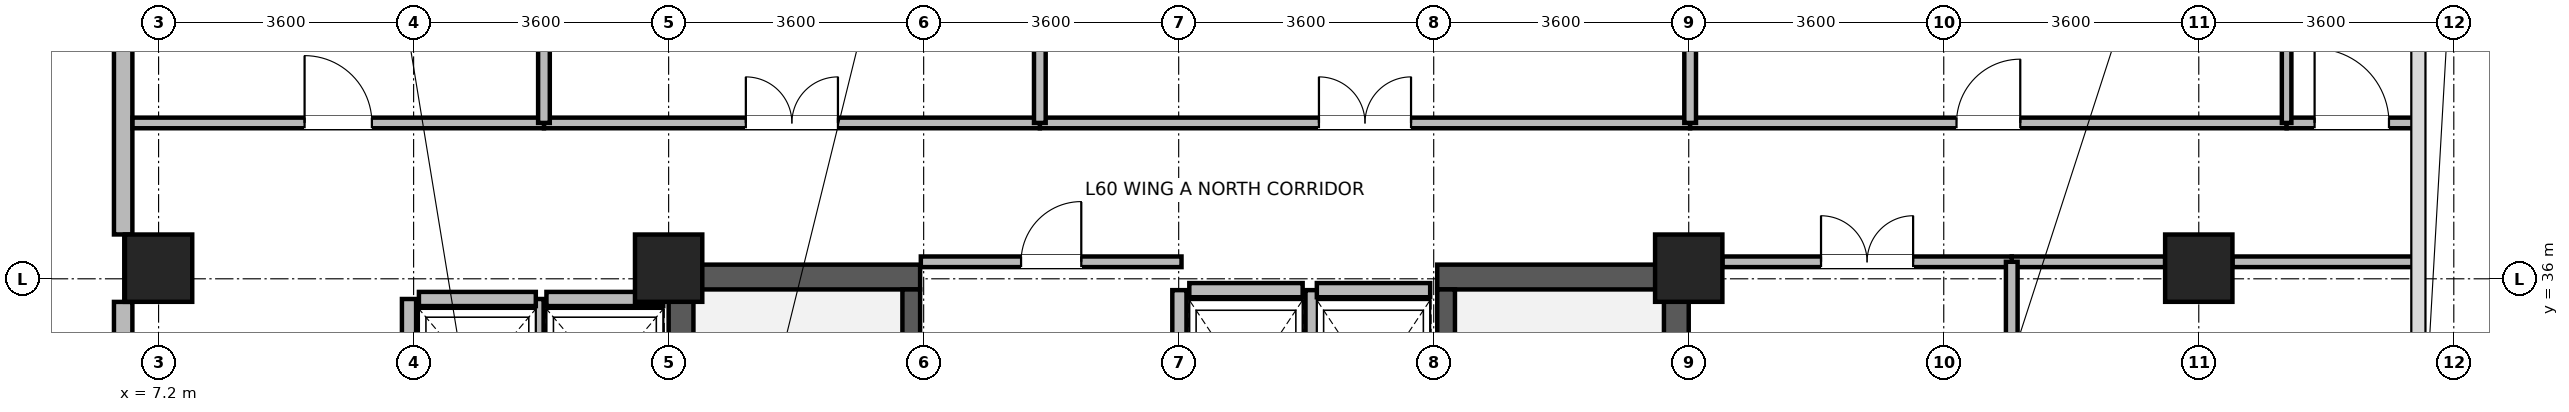
"""IFC4 building model, lengths in metres.
Left out: names, types, materials, properties, quantities, classifications, styles, units other than length and angle.
Written with IfcOpenShell. Run it as: python <this file> out.ifc"""

import sys

from ifc_helpers import new_model, si_unit, direction, frame, frame_2d, origin, origin_2d, place, context, subcontext, project, spatial, rectangle, extrude, source, transform, mapped, element, fill, save


model = new_model("IFC4")
c1 = context("Model", 3, precision=1e-05, world=origin(), true_north=direction((0.0, 1.0)))
c2 = subcontext(c1, "Body", "Model", "MODEL_VIEW")
j1 = project(units=[si_unit("LENGTHUNIT", "METRE"), si_unit("PLANEANGLEUNIT", "RADIAN")], contexts=[c1])
p1 = place(None, origin())
s1 = spatial("IfcSite", under=j1, at=p1, CompositionType="ELEMENT")
p2 = place(p1, origin())
s2 = spatial("IfcBuilding", under=s1, at=p2, CompositionType="ELEMENT")
p3 = place(p2, frame((0.0, 0.0, 235.1)))
s3 = spatial("IfcBuildingStorey", under=s2, at=p3, CompositionType="ELEMENT", Elevation=235.1)
for number, where, z_axis, x_axis in (
    (1, (14.575, 28.5, 0.0), (0.0, 0.0, 1.0), (0.0, 1.0, 0.0)),
    (2, (28.625, 28.5, 0.0), (0.0, 0.0, 1.0), (0.0, 1.0, 0.0)),
):
    element("IfcWall", number, at=place(p3, frame(where, z_axis=z_axis, x_axis=x_axis)), inside=s3, PredefinedType="SHEAR", context=c2, shape_type="SweptSolid", body=[
        extrude(rectangle(XDim=7.7, YDim=0.35, at=frame_2d((3.85, 0.0))), origin(), (0.0, 0.0, 1.0), 3.44),
    ])
for number, where, z_axis, x_axis in (
    (3, (14.75, 36.025, 0.0), (0.0, 0.0, 1.0), (1.0, 0.0, 0.0)),
    (4, (25.25, 36.025, 0.0), (0.0, 0.0, 1.0), (1.0, 0.0, 0.0)),
):
    element("IfcWall", number, at=place(p3, frame(where, z_axis=z_axis, x_axis=x_axis)), inside=s3, PredefinedType="SHEAR", context=c2, shape_type="SweptSolid", body=[
        extrude(rectangle(XDim=3.2, YDim=0.35, at=frame_2d((1.6, 0.0))), origin(), (0.0, 0.0, 1.0), 3.44),
    ])
p4 = place(p3, frame((17.825, 28.85, 0.0), z_axis=(0.0, 0.0, 1.0), x_axis=(0.0, 1.0, 0.0)))
e5 = element("IfcWall", 5, at=p4, inside=s3, PredefinedType="SHEAR", context=c2, shape_type="SweptSolid", body=[
    extrude(rectangle(XDim=7.0, YDim=0.25, at=frame_2d((3.5, 0.0))), origin(), (0.0, 0.0, 1.0), 3.44),
])
p5 = place(p4, frame((0.15, 0.0, 0.0)))
e6 = element("IfcOpeningElement", 6, at=p5, cuts=e5, PredefinedType="OPENING", context=c2, shape_type="SweptSolid", body=[
    extrude(rectangle(XDim=1.1, YDim=2.08, at=frame_2d((0.55, 1.04))), frame((0.0, 0.135, 0.0), z_axis=(0.0, -1.0, 0.0), x_axis=(1.0, 0.0, 0.0)), (0.0, 0.0, 1.0), 0.27),
])
p6 = place(p3, frame((25.375, 28.85, 0.0), z_axis=(0.0, 0.0, 1.0), x_axis=(0.0, 1.0, 0.0)))
e7 = element("IfcWall", 7, at=p6, inside=s3, PredefinedType="SHEAR", context=c2, shape_type="SweptSolid", body=[
    extrude(rectangle(XDim=7.0, YDim=0.25, at=frame_2d((3.5, 0.0))), origin(), (0.0, 0.0, 1.0), 3.44),
])
p7 = place(p6, frame((0.15, 0.0, 0.0)))
e8 = element("IfcOpeningElement", 8, at=p7, cuts=e7, PredefinedType="OPENING", context=c2, shape_type="SweptSolid", body=[
    extrude(rectangle(XDim=1.1, YDim=2.08, at=frame_2d((0.55, 1.04))), frame((0.0, 0.135, 0.0), z_axis=(0.0, -1.0, 0.0), x_axis=(1.0, 0.0, 0.0)), (0.0, 0.0, 1.0), 0.27),
])
m1 = source(origin(), c2, "Body", "SweptSolid", [
    extrude(rectangle(XDim=0.95, YDim=0.95, at=origin_2d()), origin(), (0.0, 0.0, 1.0), 3.7),
])
for number, where, z_axis, x_axis in (
    (9, (7.2, 36.15, 0.0), (0.0, 0.0, 1.0), (1.0, 0.0, 0.0)),
    (10, (14.4, 36.15, 0.0), (0.0, 0.0, 1.0), (1.0, 0.0, 0.0)),
    (11, (28.8, 36.15, 0.0), (0.0, 0.0, 1.0), (1.0, 0.0, 0.0)),
    (12, (36.0, 36.15, 0.0), (0.0, 0.0, 1.0), (1.0, 0.0, 0.0)),
):
    element("IfcColumn", number, at=place(p3, frame(where, z_axis=z_axis, x_axis=x_axis)), inside=s3, PredefinedType="COLUMN", context=c2, shape_type="MappedRepresentation", body=[
        mapped(m1, transform((0.0, 0.0, 0.0), x_axis=(1.0, 0.0, 0.0), y_axis=(0.0, 1.0, 0.0), z_axis=(0.0, 0.0, 1.0), scale=1.0)),
    ])
p8 = place(p3, frame((6.7, 36.626, 0.0), z_axis=(0.0, 0.0, 1.0), x_axis=(0.0, 1.0, 0.0)))
e13 = element("IfcWall", 13, at=p8, inside=s3, PredefinedType="STANDARD", context=c2, shape_type="SweptSolid", body=[
    extrude(rectangle(XDim=6.704, YDim=0.26, at=frame_2d((3.352, 0.0))), origin(), (0.0, 0.0, 1.0), 3.42),
])
p9 = place(p8, frame((4.428, 0.0, 0.85)))
e14 = element("IfcOpeningElement", 14, at=p9, cuts=e13, PredefinedType="OPENING", context=c2, shape_type="SweptSolid", body=[
    extrude(rectangle(XDim=1.2, YDim=1.75, at=frame_2d((0.6, 0.875))), frame((0.0, 0.14, 0.0), z_axis=(0.0, -1.0, 0.0), x_axis=(1.0, 0.0, 0.0)), (0.0, 0.0, 1.0), 0.28),
])
p10 = place(p8, frame((2.877, 0.0, 0.85)))
e15 = element("IfcOpeningElement", 15, at=p10, cuts=e13, PredefinedType="OPENING", context=c2, shape_type="SweptSolid", body=[
    extrude(rectangle(XDim=0.95, YDim=1.75, at=frame_2d((0.475, 0.875))), frame((0.0, 0.14, 0.0), z_axis=(0.0, -1.0, 0.0), x_axis=(1.0, 0.0, 0.0)), (0.0, 0.0, 1.0), 0.28),
])
p11 = place(p3, frame((6.7, 29.126, 0.0), z_axis=(0.0, 0.0, 1.0), x_axis=(0.0, 1.0, 0.0)))
e16 = element("IfcWall", 16, at=p11, inside=s3, PredefinedType="STANDARD", context=c2, shape_type="SweptSolid", body=[
    extrude(rectangle(XDim=6.548, YDim=0.26, at=frame_2d((3.274, 0.0))), origin(), (0.0, 0.0, 1.0), 3.42),
])
p12 = place(p11, frame((1.037, 0.0, 0.85)))
e17 = element("IfcOpeningElement", 17, at=p12, cuts=e16, PredefinedType="OPENING", context=c2, shape_type="SweptSolid", body=[
    extrude(rectangle(XDim=1.2, YDim=1.75, at=frame_2d((0.6, 0.875))), frame((0.0, 0.14, 0.0), z_axis=(0.0, -1.0, 0.0), x_axis=(1.0, 0.0, 0.0)), (0.0, 0.0, 1.0), 0.28),
])
p13 = place(p11, frame((4.311, 0.0, 0.85)))
e18 = element("IfcOpeningElement", 18, at=p13, cuts=e16, PredefinedType="OPENING", context=c2, shape_type="SweptSolid", body=[
    extrude(rectangle(XDim=1.2, YDim=1.75, at=frame_2d((0.6, 0.875))), frame((0.0, 0.14, 0.0), z_axis=(0.0, -1.0, 0.0), x_axis=(1.0, 0.0, 0.0)), (0.0, 0.0, 1.0), 0.28),
])
p14 = place(p3, frame((12.675, 35.715, 0.0), z_axis=(0.0, 0.0, 1.0), x_axis=(1.0, 0.0, 0.0)))
e19 = element("IfcWall", 19, at=p14, inside=s3, PredefinedType="PARTITIONING", context=c2, shape_type="SweptSolid", body=[
    extrude(rectangle(XDim=1.65, YDim=0.2, at=frame_2d((0.825, 0.0))), origin(), (0.0, 0.0, 1.0), 3.42),
])
p15 = place(p3, frame((12.535, 33.485, 0.0), z_axis=(0.0, 0.0, 1.0), x_axis=(0.0, 1.0, 0.0)))
e20 = element("IfcWall", 20, at=p15, inside=s3, PredefinedType="PARTITIONING", context=c2, shape_type="SweptSolid", body=[
    extrude(rectangle(XDim=2.23, YDim=0.2, at=frame_2d((1.115, 0.0))), origin(), (0.0, 0.0, 1.0), 3.42),
])
p16 = place(p3, frame((10.875, 35.715, 0.0), z_axis=(0.0, 0.0, 1.0), x_axis=(1.0, 0.0, 0.0)))
e21 = element("IfcWall", 21, at=p16, inside=s3, PredefinedType="PARTITIONING", context=c2, shape_type="SweptSolid", body=[
    extrude(rectangle(XDim=1.65, YDim=0.2, at=frame_2d((0.825, 0.0))), origin(), (0.0, 0.0, 1.0), 3.42),
])
p17 = place(p3, frame((10.735, 33.485, 0.0), z_axis=(0.0, 0.0, 1.0), x_axis=(0.0, 1.0, 0.0)))
e22 = element("IfcWall", 22, at=p17, inside=s3, PredefinedType="PARTITIONING", context=c2, shape_type="SweptSolid", body=[
    extrude(rectangle(XDim=2.23, YDim=0.2, at=frame_2d((1.115, 0.0))), origin(), (0.0, 0.0, 1.0), 3.42),
])
p18 = place(p3, frame((21.75, 35.84, 0.0), z_axis=(0.0, 0.0, 1.0), x_axis=(1.0, 0.0, 0.0)))
e23 = element("IfcWall", 23, at=p18, inside=s3, PredefinedType="PARTITIONING", context=c2, shape_type="SweptSolid", body=[
    extrude(rectangle(XDim=1.6, YDim=0.2, at=frame_2d((0.8, 0.0))), origin(), (0.0, 0.0, 1.0), 2.52),
])
for number, where, z_axis, x_axis in (
    (24, (21.61, 33.16, 0.0), (0.0, 0.0, 1.0), (0.0, 1.0, 0.0)),
    (25, (23.49, 33.16, 0.0), (0.0, 0.0, 1.0), (0.0, 1.0, 0.0)),
):
    element("IfcWall", number, at=place(p3, frame(where, z_axis=z_axis, x_axis=x_axis)), inside=s3, PredefinedType="PARTITIONING", context=c2, shape_type="SweptSolid", body=[
        extrude(rectangle(XDim=2.68, YDim=0.2, at=frame_2d((1.34, 0.0))), origin(), (0.0, 0.0, 1.0), 3.42),
    ])
p19 = place(p3, frame((23.55, 35.84, 0.0), z_axis=(0.0, 0.0, 1.0), x_axis=(1.0, 0.0, 0.0)))
e26 = element("IfcWall", 26, at=p19, inside=s3, PredefinedType="PARTITIONING", context=c2, shape_type="SweptSolid", body=[
    extrude(rectangle(XDim=1.6, YDim=0.2, at=frame_2d((0.8, 0.0))), origin(), (0.0, 0.0, 1.0), 2.52),
])
p20 = place(p3, frame((19.64, 38.2, 0.0), z_axis=(0.0, 0.0, 1.0), x_axis=(1.0, 0.0, 0.0)))
e27 = element("IfcWall", 27, at=p20, inside=s3, PredefinedType="PARTITIONING", context=c2, shape_type="SweptSolid", body=[
    extrude(rectangle(XDim=9.18, YDim=0.15, at=frame_2d((4.59, 0.0))), origin(), (0.0, 0.0, 1.0), 3.42),
])
p21 = place(p20, frame((3.94, 0.0, 0.0)))
e28 = element("IfcOpeningElement", 28, at=p21, cuts=e27, PredefinedType="OPENING", context=c2, shape_type="SweptSolid", body=[
    extrude(rectangle(XDim=1.3, YDim=2.12, at=frame_2d((0.65, 1.06))), frame((0.0, 0.085, 0.0), z_axis=(0.0, -1.0, 0.0), x_axis=(1.0, 0.0, 0.0)), (0.0, 0.0, 1.0), 0.17),
])
p22 = place(p3, frame((28.82, 38.2, 0.0), z_axis=(0.0, 0.0, 1.0), x_axis=(1.0, 0.0, 0.0)))
e29 = element("IfcWall", 29, at=p22, inside=s3, PredefinedType="PARTITIONING", context=c2, shape_type="SweptSolid", body=[
    extrude(rectangle(XDim=8.42, YDim=0.15, at=frame_2d((4.21, 0.0))), origin(), (0.0, 0.0, 1.0), 3.42),
])
p23 = place(p22, frame((3.76, 0.0, 0.0)))
e30 = element("IfcOpeningElement", 30, at=p23, cuts=e29, PredefinedType="OPENING", context=c2, shape_type="SweptSolid", body=[
    extrude(rectangle(XDim=0.9, YDim=2.08, at=frame_2d((0.45, 1.04))), frame((0.0, 0.085, 0.0), z_axis=(0.0, -1.0, 0.0), x_axis=(1.0, 0.0, 0.0)), (0.0, 0.0, 1.0), 0.17),
])
p24 = place(p3, frame((12.64, 38.2, 0.0), z_axis=(0.0, 0.0, 1.0), x_axis=(1.0, 0.0, 0.0)))
e31 = element("IfcWall", 31, at=p24, inside=s3, PredefinedType="PARTITIONING", context=c2, shape_type="SweptSolid", body=[
    extrude(rectangle(XDim=7.0, YDim=0.15, at=frame_2d((3.5, 0.0))), origin(), (0.0, 0.0, 1.0), 3.42),
])
p25 = place(p24, frame((2.85, 0.0, 0.0)))
e32 = element("IfcOpeningElement", 32, at=p25, cuts=e31, PredefinedType="OPENING", context=c2, shape_type="SweptSolid", body=[
    extrude(rectangle(XDim=1.3, YDim=2.12, at=frame_2d((0.65, 1.06))), frame((0.0, 0.085, 0.0), z_axis=(0.0, -1.0, 0.0), x_axis=(1.0, 0.0, 0.0)), (0.0, 0.0, 1.0), 0.17),
])
p26 = place(p3, frame((6.832, 38.2, 0.0), z_axis=(0.0, 0.0, 1.0), x_axis=(1.0, 0.0, 0.0)))
e33 = element("IfcWall", 33, at=p26, inside=s3, PredefinedType="PARTITIONING", context=c2, shape_type="SweptSolid", body=[
    extrude(rectangle(XDim=5.808, YDim=0.15, at=frame_2d((2.904, 0.0))), origin(), (0.0, 0.0, 1.0), 3.42),
])
p27 = place(p26, frame((2.429, 0.0, 0.0)))
e34 = element("IfcOpeningElement", 34, at=p27, cuts=e33, PredefinedType="OPENING", context=c2, shape_type="SweptSolid", body=[
    extrude(rectangle(XDim=0.95, YDim=2.1, at=frame_2d((0.475, 1.05))), frame((0.0, 0.085, 0.0), z_axis=(0.0, -1.0, 0.0), x_axis=(1.0, 0.0, 0.0)), (0.0, 0.0, 1.0), 0.17),
])
p28 = place(p3, frame((33.36, 36.24, 0.0), z_axis=(0.0, 0.0, 1.0), x_axis=(1.0, 0.0, 0.0)))
e35 = element("IfcWall", 35, at=p28, inside=s3, PredefinedType="PARTITIONING", context=c2, shape_type="SweptSolid", body=[
    extrude(rectangle(XDim=2.165, YDim=0.15, at=frame_2d((1.083, 0.0))), origin(), (0.0, 0.0, 1.0), 2.87),
])
p29 = place(p3, frame((36.475, 36.24, 0.0), z_axis=(0.0, 0.0, 1.0), x_axis=(1.0, 0.0, 0.0)))
e36 = element("IfcWall", 36, at=p29, inside=s3, PredefinedType="PARTITIONING", context=c2, shape_type="SweptSolid", body=[
    extrude(rectangle(XDim=2.605, YDim=0.15, at=frame_2d((1.302, 0.0))), origin(), (0.0, 0.0, 1.0), 3.42),
])
p30 = place(p3, frame((29.275, 36.24, 0.0), z_axis=(0.0, 0.0, 1.0), x_axis=(1.0, 0.0, 0.0)))
e37 = element("IfcWall", 37, at=p30, inside=s3, PredefinedType="PARTITIONING", context=c2, shape_type="SweptSolid", body=[
    extrude(rectangle(XDim=4.085, YDim=0.15, at=frame_2d((2.042, 0.0))), origin(), (0.0, 0.0, 1.0), 2.87),
])
p31 = place(p30, frame((1.393, 0.0, 0.0)))
e38 = element("IfcOpeningElement", 38, at=p31, cuts=e37, PredefinedType="OPENING", context=c2, shape_type="SweptSolid", body=[
    extrude(rectangle(XDim=1.3, YDim=2.12, at=frame_2d((0.65, 1.06))), frame((0.0, 0.085, 0.0), z_axis=(0.0, -1.0, 0.0), x_axis=(1.0, 0.0, 0.0)), (0.0, 0.0, 1.0), 0.17),
])
p32 = place(p3, frame((17.96, 36.24, 0.0), z_axis=(0.0, 0.0, 1.0), x_axis=(1.0, 0.0, 0.0)))
e39 = element("IfcWall", 39, at=p32, inside=s3, PredefinedType="PARTITIONING", context=c2, shape_type="SweptSolid", body=[
    extrude(rectangle(XDim=3.68, YDim=0.15, at=frame_2d((1.84, 0.0))), origin(), (0.0, 0.0, 1.0), 2.52),
])
p33 = place(p32, frame((1.415, 0.0, 0.0)))
e40 = element("IfcOpeningElement", 40, at=p33, cuts=e39, PredefinedType="OPENING", context=c2, shape_type="SweptSolid", body=[
    extrude(rectangle(XDim=0.85, YDim=2.04, at=frame_2d((0.425, 1.02))), frame((0.0, 0.085, 0.0), z_axis=(0.0, -1.0, 0.0), x_axis=(1.0, 0.0, 0.0)), (0.0, 0.0, 1.0), 0.17),
])
p34 = place(p3, frame((37.24, 38.2, 0.0), z_axis=(0.0, 0.0, 1.0), x_axis=(1.0, 0.0, 0.0)))
e41 = element("IfcWall", 41, at=p34, inside=s3, PredefinedType="PARTITIONING", context=c2, shape_type="SweptSolid", body=[
    extrude(rectangle(XDim=1.84, YDim=0.15, at=frame_2d((0.92, 0.0))), origin(), (0.0, 0.0, 1.0), 3.42),
])
p35 = place(p34, frame((0.395, 0.0, 0.0)))
e42 = element("IfcOpeningElement", 42, at=p35, cuts=e41, PredefinedType="OPENING", context=c2, shape_type="SweptSolid", body=[
    extrude(rectangle(XDim=1.05, YDim=2.12, at=frame_2d((0.525, 1.06))), frame((0.0, 0.085, 0.0), z_axis=(0.0, -1.0, 0.0), x_axis=(1.0, 0.0, 0.0)), (0.0, 0.0, 1.0), 0.17),
])
p36 = place(p3, frame((19.64, 38.2, 0.0), z_axis=(0.0, 0.0, 1.0), x_axis=(0.0, 1.0, 0.0)))
e43 = element("IfcWall", 43, at=p36, inside=s3, PredefinedType="PARTITIONING", context=c2, shape_type="SweptSolid", body=[
    extrude(rectangle(XDim=4.868, YDim=0.165, at=frame_2d((2.434, 0.0))), origin(), (0.0, 0.0, 1.0), 3.42),
])
p37 = place(p3, frame((28.82, 38.2, 0.0), z_axis=(0.0, 0.0, 1.0), x_axis=(0.0, 1.0, 0.0)))
e44 = element("IfcWall", 44, at=p37, inside=s3, PredefinedType="PARTITIONING", context=c2, shape_type="SweptSolid", body=[
    extrude(rectangle(XDim=4.868, YDim=0.165, at=frame_2d((2.434, 0.0))), origin(), (0.0, 0.0, 1.0), 2.97),
])
p38 = place(p3, frame((37.24, 38.2, 0.0), z_axis=(0.0, 0.0, 1.0), x_axis=(0.0, 1.0, 0.0)))
e45 = element("IfcWall", 45, at=p38, inside=s3, PredefinedType="PARTITIONING", context=c2, shape_type="SweptSolid", body=[
    extrude(rectangle(XDim=4.868, YDim=0.135, at=frame_2d((2.434, 0.0))), origin(), (0.0, 0.0, 1.0), 3.42),
])
p39 = place(p3, frame((33.36, 32.4, 0.0), z_axis=(0.0, 0.0, 1.0), x_axis=(0.0, 1.0, 0.0)))
e46 = element("IfcWall", 46, at=p39, inside=s3, PredefinedType="PARTITIONING", context=c2, shape_type="SweptSolid", body=[
    extrude(rectangle(XDim=3.84, YDim=0.165, at=frame_2d((1.92, 0.0))), origin(), (0.0, 0.0, 1.0), 3.42),
])
p40 = place(p3, frame((12.64, 38.2, 0.0), z_axis=(0.0, 0.0, 1.0), x_axis=(0.0, 1.0, 0.0)))
e47 = element("IfcWall", 47, at=p40, inside=s3, PredefinedType="PARTITIONING", context=c2, shape_type="SweptSolid", body=[
    extrude(rectangle(XDim=3.1, YDim=0.165, at=frame_2d((1.55, 0.0))), origin(), (0.0, 0.0, 1.0), 3.42),
])
p41 = place(p21, origin())
e48 = element("IfcDoor", 48, at=p41, inside=s3, OperationType="DOUBLE_DOOR_SINGLE_SWING", PredefinedType="DOOR", context=c2, shape_type="SweptSolid", body=[
    extrude(rectangle(XDim=1.3, YDim=2.12, at=frame_2d((0.65, 1.06))), frame((0.0, 0.025, 0.0), z_axis=(0.0, -1.0, 0.0), x_axis=(1.0, 0.0, 0.0)), (0.0, 0.0, 1.0), 0.05),
])
fill(e28, e48)
p42 = place(p23, origin())
e49 = element("IfcDoor", 49, at=p42, inside=s3, OperationType="SINGLE_SWING_RIGHT", PredefinedType="DOOR", context=c2, shape_type="SweptSolid", body=[
    extrude(rectangle(XDim=0.9, YDim=2.08, at=frame_2d((0.45, 1.04))), frame((0.0, 0.025, 0.0), z_axis=(0.0, -1.0, 0.0), x_axis=(1.0, 0.0, 0.0)), (0.0, 0.0, 1.0), 0.05),
])
fill(e30, e49)
p43 = place(p25, origin())
e50 = element("IfcDoor", 50, at=p43, inside=s3, OperationType="DOUBLE_DOOR_SINGLE_SWING", PredefinedType="DOOR", context=c2, shape_type="SweptSolid", body=[
    extrude(rectangle(XDim=1.3, YDim=2.12, at=frame_2d((0.65, 1.06))), frame((0.0, 0.025, 0.0), z_axis=(0.0, -1.0, 0.0), x_axis=(1.0, 0.0, 0.0)), (0.0, 0.0, 1.0), 0.05),
])
fill(e32, e50)
p44 = place(p27, origin())
e51 = element("IfcDoor", 51, at=p44, inside=s3, OperationType="SINGLE_SWING_LEFT", PredefinedType="DOOR", context=c2, shape_type="SweptSolid", body=[
    extrude(rectangle(XDim=0.95, YDim=2.1, at=frame_2d((0.475, 1.05))), frame((0.0, 0.025, 0.0), z_axis=(0.0, -1.0, 0.0), x_axis=(1.0, 0.0, 0.0)), (0.0, 0.0, 1.0), 0.05),
])
fill(e34, e51)
p45 = place(p31, origin())
e52 = element("IfcDoor", 52, at=p45, inside=s3, OperationType="DOUBLE_DOOR_SINGLE_SWING", PredefinedType="DOOR", context=c2, shape_type="SweptSolid", body=[
    extrude(rectangle(XDim=1.3, YDim=2.12, at=frame_2d((0.65, 1.06))), frame((0.0, 0.025, 0.0), z_axis=(0.0, -1.0, 0.0), x_axis=(1.0, 0.0, 0.0)), (0.0, 0.0, 1.0), 0.05),
])
fill(e38, e52)
p46 = place(p33, origin())
e53 = element("IfcDoor", 53, at=p46, inside=s3, OperationType="SINGLE_SWING_RIGHT", PredefinedType="DOOR", context=c2, shape_type="SweptSolid", body=[
    extrude(rectangle(XDim=0.85, YDim=2.04, at=frame_2d((0.425, 1.02))), frame((0.0, 0.025, 0.0), z_axis=(0.0, -1.0, 0.0), x_axis=(1.0, 0.0, 0.0)), (0.0, 0.0, 1.0), 0.05),
])
fill(e40, e53)
p47 = place(p35, origin())
e54 = element("IfcDoor", 54, at=p47, inside=s3, OperationType="SINGLE_SWING_LEFT", PredefinedType="DOOR", context=c2, shape_type="SweptSolid", body=[
    extrude(rectangle(XDim=1.05, YDim=2.12, at=frame_2d((0.525, 1.06))), frame((0.0, 0.025, 0.0), z_axis=(0.0, -1.0, 0.0), x_axis=(1.0, 0.0, 0.0)), (0.0, 0.0, 1.0), 0.05),
])
fill(e42, e54)
save(model, sys.argv[1])
